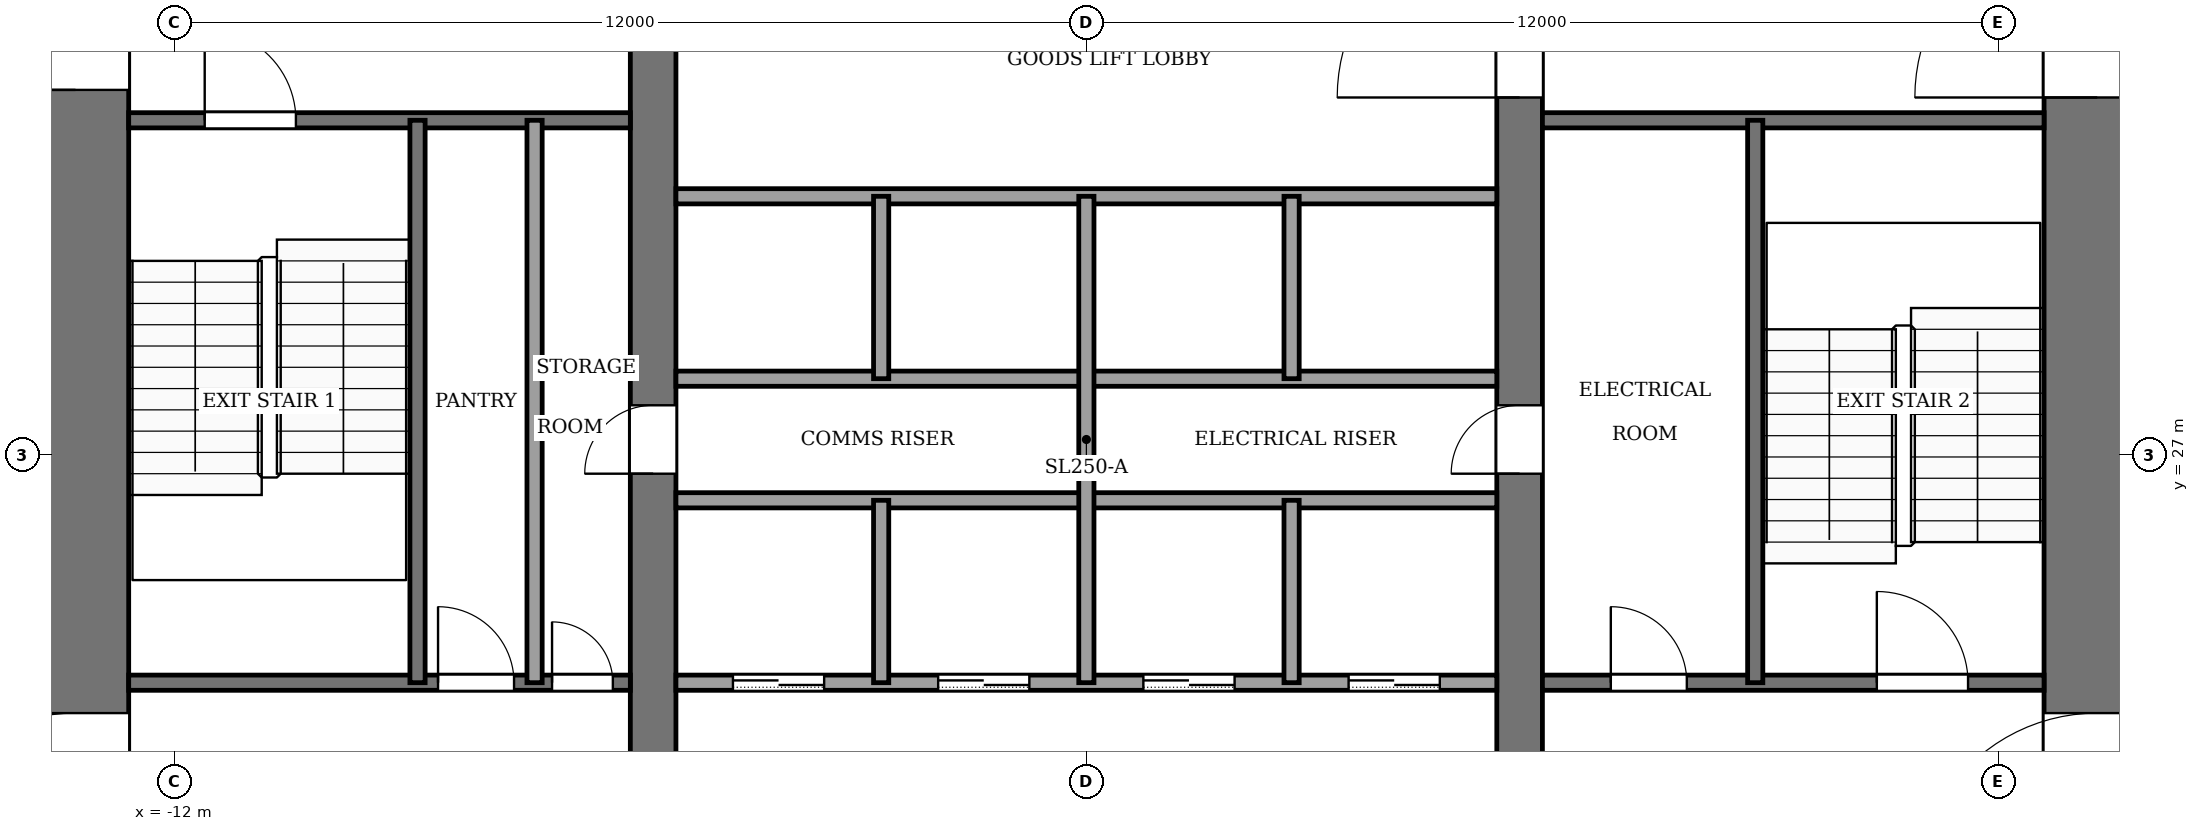
"""IFC4 building model, lengths in metres.
Left out: names, types, materials, properties, quantities, classifications, styles, units other than length and angle.
Written with IfcOpenShell. Run it as: python <this file> out.ifc"""

import sys

from ifc_helpers import new_model, si_unit, direction, frame, frame_2d, origin, place, context, subcontext, project, spatial, rectangle, extrude, element, fill, save


model = new_model("IFC4")
c1 = context("Model", 3, precision=1e-05, world=origin(), true_north=direction((0.0, 1.0)))
c2 = subcontext(c1, "Body", "Model", "MODEL_VIEW")
j1 = project(units=[si_unit("LENGTHUNIT", "METRE"), si_unit("PLANEANGLEUNIT", "RADIAN")], contexts=[c1])
p1 = place(None, origin())
s1 = spatial("IfcSite", under=j1, at=p1, CompositionType="ELEMENT")
p2 = place(p1, origin())
s2 = spatial("IfcBuilding", under=s1, at=p2, CompositionType="ELEMENT")
p3 = place(p2, frame((0.0, 0.0, 34.0)))
s3 = spatial("IfcBuildingStorey", under=s2, at=p3, CompositionType="ELEMENT", Elevation=34.0)
p4 = place(p3, frame((-13.3, 18.4, -0.13), z_axis=(0.0, 0.0, 1.0), x_axis=(0.0, 1.0, 0.0)))
e1 = element("IfcWall", 1, at=p4, inside=s3, PredefinedType="SHEAR", context=c2, shape_type="SweptSolid", body=[
    extrude(rectangle(XDim=19.2, YDim=1.4, at=frame_2d((9.6, 0.0))), origin(), (0.0, 0.0, 1.0), 4.0),
])
p5 = place(p4, frame((2.8, 0.0, 0.13)))
e2 = element("IfcOpeningElement", 2, at=p5, cuts=e1, PredefinedType="OPENING", context=c2, shape_type="SweptSolid", body=[
    extrude(rectangle(XDim=2.4, YDim=2.4, at=frame_2d((1.2, 1.2))), frame((0.0, 0.71, 0.0), z_axis=(0.0, -1.0, 0.0), x_axis=(1.0, 0.0, 0.0)), (0.0, 0.0, 1.0), 1.42),
])
p6 = place(p4, frame((13.4, 0.0, 0.13)))
e3 = element("IfcOpeningElement", 3, at=p6, cuts=e1, PredefinedType="OPENING", context=c2, shape_type="SweptSolid", body=[
    extrude(rectangle(XDim=1.4, YDim=2.2, at=frame_2d((0.7, 1.1))), frame((0.0, 0.71, 0.0), z_axis=(0.0, -1.0, 0.0), x_axis=(1.0, 0.0, 0.0)), (0.0, 0.0, 1.0), 1.42),
])
p7 = place(p3, frame((13.3, 18.4, -0.13), z_axis=(0.0, 0.0, 1.0), x_axis=(0.0, 1.0, 0.0)))
e4 = element("IfcWall", 4, at=p7, inside=s3, PredefinedType="SHEAR", context=c2, shape_type="SweptSolid", body=[
    extrude(rectangle(XDim=19.2, YDim=1.4, at=frame_2d((9.6, 0.0))), origin(), (0.0, 0.0, 1.0), 4.0),
])
p8 = place(p7, frame((2.8, 0.0, 0.13)))
e5 = element("IfcOpeningElement", 5, at=p8, cuts=e4, PredefinedType="OPENING", context=c2, shape_type="SweptSolid", body=[
    extrude(rectangle(XDim=2.4, YDim=2.4, at=frame_2d((1.2, 1.2))), frame((0.0, 0.71, 0.0), z_axis=(0.0, -1.0, 0.0), x_axis=(1.0, 0.0, 0.0)), (0.0, 0.0, 1.0), 1.42),
])
p9 = place(p7, frame((13.3, 0.0, 0.13)))
e6 = element("IfcOpeningElement", 6, at=p9, cuts=e4, PredefinedType="OPENING", context=c2, shape_type="SweptSolid", body=[
    extrude(rectangle(XDim=2.4, YDim=2.4, at=frame_2d((1.2, 1.2))), frame((0.0, 0.71, 0.0), z_axis=(0.0, -1.0, 0.0), x_axis=(1.0, 0.0, 0.0)), (0.0, 0.0, 1.0), 1.42),
])
p10 = place(p3, frame((-5.7, 18.4, -0.13), z_axis=(0.0, 0.0, 1.0), x_axis=(0.0, 1.0, 0.0)))
e7 = element("IfcWall", 7, at=p10, inside=s3, PredefinedType="SHEAR", context=c2, shape_type="SweptSolid", body=[
    extrude(rectangle(XDim=19.2, YDim=0.6, at=frame_2d((9.6, 0.0))), origin(), (0.0, 0.0, 1.0), 4.0),
])
p11 = place(p10, frame((8.35, 0.0, 0.13)))
e8 = element("IfcOpeningElement", 8, at=p11, cuts=e7, PredefinedType="OPENING", context=c2, shape_type="SweptSolid", body=[
    extrude(rectangle(XDim=0.9, YDim=2.1, at=frame_2d((0.45, 1.05))), frame((0.0, 0.31, 0.0), z_axis=(0.0, -1.0, 0.0), x_axis=(1.0, 0.0, 0.0)), (0.0, 0.0, 1.0), 0.62),
])
p12 = place(p3, frame((5.7, 18.4, -0.13), z_axis=(0.0, 0.0, 1.0), x_axis=(0.0, 1.0, 0.0)))
e9 = element("IfcWall", 9, at=p12, inside=s3, PredefinedType="SHEAR", context=c2, shape_type="SweptSolid", body=[
    extrude(rectangle(XDim=19.2, YDim=0.6, at=frame_2d((9.6, 0.0))), origin(), (0.0, 0.0, 1.0), 4.0),
])
p13 = place(p12, frame((8.35, 0.0, 0.13)))
e10 = element("IfcOpeningElement", 10, at=p13, cuts=e9, PredefinedType="OPENING", context=c2, shape_type="SweptSolid", body=[
    extrude(rectangle(XDim=0.9, YDim=2.1, at=frame_2d((0.45, 1.05))), frame((0.0, 0.31, 0.0), z_axis=(0.0, -1.0, 0.0), x_axis=(1.0, 0.0, 0.0)), (0.0, 0.0, 1.0), 0.62),
])
p14 = place(p12, frame((13.3, 0.0, 0.13)))
e11 = element("IfcOpeningElement", 11, at=p14, cuts=e9, PredefinedType="OPENING", context=c2, shape_type="SweptSolid", body=[
    extrude(rectangle(XDim=2.4, YDim=2.4, at=frame_2d((1.2, 1.2))), frame((0.0, 0.31, 0.0), z_axis=(0.0, -1.0, 0.0), x_axis=(1.0, 0.0, 0.0)), (0.0, 0.0, 1.0), 0.62),
])
p15 = place(p3, frame((-12.6, 24.0, 0.0), z_axis=(0.0, 0.0, 1.0), x_axis=(1.0, 0.0, 0.0)))
e12 = element("IfcWall", 12, at=p15, inside=s3, PredefinedType="PARTITIONING", context=c2, shape_type="SweptSolid", body=[
    extrude(rectangle(XDim=6.6, YDim=0.2, at=frame_2d((3.3, 0.0))), origin(), (0.0, 0.0, 1.0), 3.87),
])
p16 = place(p15, frame((4.07, 0.0, 0.0)))
e13 = element("IfcOpeningElement", 13, at=p16, cuts=e12, PredefinedType="OPENING", context=c2, shape_type="SweptSolid", body=[
    extrude(rectangle(XDim=1.0, YDim=2.1, at=frame_2d((0.5, 1.05))), frame((0.0, 0.11, 0.0), z_axis=(0.0, -1.0, 0.0), x_axis=(1.0, 0.0, 0.0)), (0.0, 0.0, 1.0), 0.22),
])
p17 = place(p15, frame((5.57, 0.0, 0.0)))
e14 = element("IfcOpeningElement", 14, at=p17, cuts=e12, PredefinedType="OPENING", context=c2, shape_type="SweptSolid", body=[
    extrude(rectangle(XDim=0.8, YDim=2.1, at=frame_2d((0.4, 1.05))), frame((0.0, 0.11, 0.0), z_axis=(0.0, -1.0, 0.0), x_axis=(1.0, 0.0, 0.0)), (0.0, 0.0, 1.0), 0.22),
])
p18 = place(p3, frame((-5.4, 24.0, 0.0), z_axis=(0.0, 0.0, 1.0), x_axis=(1.0, 0.0, 0.0)))
e15 = element("IfcWall", 15, at=p18, inside=s3, PredefinedType="PARTITIONING", context=c2, shape_type="SweptSolid", body=[
    extrude(rectangle(XDim=10.8, YDim=0.2, at=frame_2d((5.4, 0.0))), origin(), (0.0, 0.0, 1.0), 3.87),
])
p19 = place(p18, frame((0.75, 0.0, 0.0)))
e16 = element("IfcOpeningElement", 16, at=p19, cuts=e15, PredefinedType="OPENING", context=c2, shape_type="SweptSolid", body=[
    extrude(rectangle(XDim=1.2, YDim=2.2, at=frame_2d((0.6, 1.1))), frame((0.0, 0.11, 0.0), z_axis=(0.0, -1.0, 0.0), x_axis=(1.0, 0.0, 0.0)), (0.0, 0.0, 1.0), 0.22),
])
p20 = place(p18, frame((3.45, 0.0, 0.0)))
e17 = element("IfcOpeningElement", 17, at=p20, cuts=e15, PredefinedType="OPENING", context=c2, shape_type="SweptSolid", body=[
    extrude(rectangle(XDim=1.2, YDim=2.2, at=frame_2d((0.6, 1.1))), frame((0.0, 0.11, 0.0), z_axis=(0.0, -1.0, 0.0), x_axis=(1.0, 0.0, 0.0)), (0.0, 0.0, 1.0), 0.22),
])
p21 = place(p18, frame((6.15, 0.0, 0.0)))
e18 = element("IfcOpeningElement", 18, at=p21, cuts=e15, PredefinedType="OPENING", context=c2, shape_type="SweptSolid", body=[
    extrude(rectangle(XDim=1.2, YDim=2.2, at=frame_2d((0.6, 1.1))), frame((0.0, 0.11, 0.0), z_axis=(0.0, -1.0, 0.0), x_axis=(1.0, 0.0, 0.0)), (0.0, 0.0, 1.0), 0.22),
])
p22 = place(p18, frame((8.85, 0.0, 0.0)))
e19 = element("IfcOpeningElement", 19, at=p22, cuts=e15, PredefinedType="OPENING", context=c2, shape_type="SweptSolid", body=[
    extrude(rectangle(XDim=1.2, YDim=2.2, at=frame_2d((0.6, 1.1))), frame((0.0, 0.11, 0.0), z_axis=(0.0, -1.0, 0.0), x_axis=(1.0, 0.0, 0.0)), (0.0, 0.0, 1.0), 0.22),
])
p23 = place(p3, frame((6.0, 24.0, 0.0), z_axis=(0.0, 0.0, 1.0), x_axis=(1.0, 0.0, 0.0)))
e20 = element("IfcWall", 20, at=p23, inside=s3, PredefinedType="PARTITIONING", context=c2, shape_type="SweptSolid", body=[
    extrude(rectangle(XDim=6.6, YDim=0.2, at=frame_2d((3.3, 0.0))), origin(), (0.0, 0.0, 1.0), 3.87),
])
p24 = place(p23, frame((0.9, 0.0, 0.0)))
e21 = element("IfcOpeningElement", 21, at=p24, cuts=e20, PredefinedType="OPENING", context=c2, shape_type="SweptSolid", body=[
    extrude(rectangle(XDim=1.0, YDim=2.1, at=frame_2d((0.5, 1.05))), frame((0.0, 0.11, 0.0), z_axis=(0.0, -1.0, 0.0), x_axis=(1.0, 0.0, 0.0)), (0.0, 0.0, 1.0), 0.22),
])
p25 = place(p23, frame((4.4, 0.0, 0.0)))
e22 = element("IfcOpeningElement", 22, at=p25, cuts=e20, PredefinedType="OPENING", context=c2, shape_type="SweptSolid", body=[
    extrude(rectangle(XDim=1.2, YDim=2.2, at=frame_2d((0.6, 1.1))), frame((0.0, 0.11, 0.0), z_axis=(0.0, -1.0, 0.0), x_axis=(1.0, 0.0, 0.0)), (0.0, 0.0, 1.0), 0.22),
])
for number, where, z_axis, x_axis in (
    (23, (-5.4, 26.4, 0.0), (0.0, 0.0, 1.0), (1.0, 0.0, 0.0)),
    (24, (-5.4, 28.0, 0.0), (0.0, 0.0, 1.0), (1.0, 0.0, 0.0)),
    (25, (-5.4, 30.4, 0.0), (0.0, 0.0, 1.0), (1.0, 0.0, 0.0)),
):
    element("IfcWall", number, at=place(p3, frame(where, z_axis=z_axis, x_axis=x_axis)), inside=s3, PredefinedType="PARTITIONING", context=c2, shape_type="SweptSolid", body=[
        extrude(rectangle(XDim=10.8, YDim=0.2, at=frame_2d((5.4, 0.0))), origin(), (0.0, 0.0, 1.0), 3.87),
    ])
p26 = place(p3, frame((-12.6, 31.4, 0.0), z_axis=(0.0, 0.0, 1.0), x_axis=(1.0, 0.0, 0.0)))
e26 = element("IfcWall", 26, at=p26, inside=s3, PredefinedType="PARTITIONING", context=c2, shape_type="SweptSolid", body=[
    extrude(rectangle(XDim=6.6, YDim=0.2, at=frame_2d((3.3, 0.0))), origin(), (0.0, 0.0, 1.0), 3.87),
])
p27 = place(p26, frame((1.0, 0.0, 0.0)))
e27 = element("IfcOpeningElement", 27, at=p27, cuts=e26, PredefinedType="OPENING", context=c2, shape_type="SweptSolid", body=[
    extrude(rectangle(XDim=1.2, YDim=2.2, at=frame_2d((0.6, 1.1))), frame((0.0, 0.11, 0.0), z_axis=(0.0, -1.0, 0.0), x_axis=(1.0, 0.0, 0.0)), (0.0, 0.0, 1.0), 0.22),
])
p28 = place(p3, frame((6.0, 31.4, 0.0), z_axis=(0.0, 0.0, 1.0), x_axis=(1.0, 0.0, 0.0)))
e28 = element("IfcWall", 28, at=p28, inside=s3, PredefinedType="PARTITIONING", context=c2, shape_type="SweptSolid", body=[
    extrude(rectangle(XDim=6.6, YDim=0.2, at=frame_2d((3.3, 0.0))), origin(), (0.0, 0.0, 1.0), 3.87),
])
for number, where, z_axis, x_axis in (
    (29, (-8.8, 24.0, 0.0), (0.0, 0.0, 1.0), (0.0, 1.0, 0.0)),
    (30, (-7.26, 24.0, 0.0), (0.0, 0.0, 1.0), (0.0, 1.0, 0.0)),
):
    element("IfcWall", number, at=place(p3, frame(where, z_axis=z_axis, x_axis=x_axis)), inside=s3, PredefinedType="PARTITIONING", context=c2, shape_type="SweptSolid", body=[
        extrude(rectangle(XDim=7.4, YDim=0.2, at=frame_2d((3.7, 0.0))), origin(), (0.0, 0.0, 1.0), 3.87),
    ])
for number, where, z_axis, x_axis in (
    (31, (-2.7, 24.0, 0.0), (0.0, 0.0, 1.0), (0.0, 1.0, 0.0)),
    (32, (-2.7, 28.0, 0.0), (0.0, 0.0, 1.0), (0.0, 1.0, 0.0)),
):
    element("IfcWall", number, at=place(p3, frame(where, z_axis=z_axis, x_axis=x_axis)), inside=s3, PredefinedType="PARTITIONING", context=c2, shape_type="SweptSolid", body=[
        extrude(rectangle(XDim=2.4, YDim=0.2, at=frame_2d((1.2, 0.0))), origin(), (0.0, 0.0, 1.0), 3.87),
    ])
p29 = place(p3, frame((0.0, 24.0, 0.0), z_axis=(0.0, 0.0, 1.0), x_axis=(0.0, 1.0, 0.0)))
e33 = element("IfcWall", 33, at=p29, inside=s3, PredefinedType="PARTITIONING", context=c2, shape_type="SweptSolid", body=[
    extrude(rectangle(XDim=6.4, YDim=0.2, at=frame_2d((3.2, 0.0))), origin(), (0.0, 0.0, 1.0), 3.87),
])
for number, where, z_axis, x_axis in (
    (34, (2.7, 24.0, 0.0), (0.0, 0.0, 1.0), (0.0, 1.0, 0.0)),
    (35, (2.7, 28.0, 0.0), (0.0, 0.0, 1.0), (0.0, 1.0, 0.0)),
):
    element("IfcWall", number, at=place(p3, frame(where, z_axis=z_axis, x_axis=x_axis)), inside=s3, PredefinedType="PARTITIONING", context=c2, shape_type="SweptSolid", body=[
        extrude(rectangle(XDim=2.4, YDim=0.2, at=frame_2d((1.2, 0.0))), origin(), (0.0, 0.0, 1.0), 3.87),
    ])
p30 = place(p3, frame((8.8, 24.0, 0.0), z_axis=(0.0, 0.0, 1.0), x_axis=(0.0, 1.0, 0.0)))
e36 = element("IfcWall", 36, at=p30, inside=s3, PredefinedType="PARTITIONING", context=c2, shape_type="SweptSolid", body=[
    extrude(rectangle(XDim=7.4, YDim=0.2, at=frame_2d((3.7, 0.0))), origin(), (0.0, 0.0, 1.0), 3.87),
])
p31 = place(p19, origin())
e37 = element("IfcDoor", 37, at=p31, inside=s3, OperationType="SLIDING_TO_LEFT", PredefinedType="DOOR", context=c2, shape_type="SweptSolid", body=[
    extrude(rectangle(XDim=1.2, YDim=2.2, at=frame_2d((0.6, 1.1))), frame((0.0, 0.025, 0.0), z_axis=(0.0, -1.0, 0.0), x_axis=(1.0, 0.0, 0.0)), (0.0, 0.0, 1.0), 0.05),
])
fill(e16, e37)
p32 = place(p20, origin())
e38 = element("IfcDoor", 38, at=p32, inside=s3, OperationType="SLIDING_TO_LEFT", PredefinedType="DOOR", context=c2, shape_type="SweptSolid", body=[
    extrude(rectangle(XDim=1.2, YDim=2.2, at=frame_2d((0.6, 1.1))), frame((0.0, 0.025, 0.0), z_axis=(0.0, -1.0, 0.0), x_axis=(1.0, 0.0, 0.0)), (0.0, 0.0, 1.0), 0.05),
])
fill(e17, e38)
p33 = place(p21, origin())
e39 = element("IfcDoor", 39, at=p33, inside=s3, OperationType="SLIDING_TO_LEFT", PredefinedType="DOOR", context=c2, shape_type="SweptSolid", body=[
    extrude(rectangle(XDim=1.2, YDim=2.2, at=frame_2d((0.6, 1.1))), frame((0.0, 0.025, 0.0), z_axis=(0.0, -1.0, 0.0), x_axis=(1.0, 0.0, 0.0)), (0.0, 0.0, 1.0), 0.05),
])
fill(e18, e39)
p34 = place(p22, origin())
e40 = element("IfcDoor", 40, at=p34, inside=s3, OperationType="SLIDING_TO_LEFT", PredefinedType="DOOR", context=c2, shape_type="SweptSolid", body=[
    extrude(rectangle(XDim=1.2, YDim=2.2, at=frame_2d((0.6, 1.1))), frame((0.0, 0.025, 0.0), z_axis=(0.0, -1.0, 0.0), x_axis=(1.0, 0.0, 0.0)), (0.0, 0.0, 1.0), 0.05),
])
fill(e19, e40)
p35 = place(p16, origin())
e41 = element("IfcDoor", 41, at=p35, inside=s3, OperationType="SINGLE_SWING_RIGHT", PredefinedType="DOOR", context=c2, shape_type="SweptSolid", body=[
    extrude(rectangle(XDim=1.0, YDim=2.1, at=frame_2d((0.5, 1.05))), frame((0.0, 0.025, 0.0), z_axis=(0.0, -1.0, 0.0), x_axis=(1.0, 0.0, 0.0)), (0.0, 0.0, 1.0), 0.05),
])
fill(e13, e41)
p36 = place(p17, origin())
e42 = element("IfcDoor", 42, at=p36, inside=s3, OperationType="SINGLE_SWING_LEFT", PredefinedType="DOOR", context=c2, shape_type="SweptSolid", body=[
    extrude(rectangle(XDim=0.8, YDim=2.1, at=frame_2d((0.4, 1.05))), frame((0.0, 0.025, 0.0), z_axis=(0.0, -1.0, 0.0), x_axis=(1.0, 0.0, 0.0)), (0.0, 0.0, 1.0), 0.05),
])
fill(e14, e42)
p37 = place(p24, origin())
e43 = element("IfcDoor", 43, at=p37, inside=s3, OperationType="SINGLE_SWING_RIGHT", PredefinedType="DOOR", context=c2, shape_type="SweptSolid", body=[
    extrude(rectangle(XDim=1.0, YDim=2.1, at=frame_2d((0.5, 1.05))), frame((0.0, 0.025, 0.0), z_axis=(0.0, -1.0, 0.0), x_axis=(1.0, 0.0, 0.0)), (0.0, 0.0, 1.0), 0.05),
])
fill(e21, e43)
p38 = place(p11, origin())
e44 = element("IfcDoor", 44, at=p38, inside=s3, OperationType="SINGLE_SWING_LEFT", PredefinedType="DOOR", context=c2, shape_type="SweptSolid", body=[
    extrude(rectangle(XDim=0.9, YDim=2.1, at=frame_2d((0.45, 1.05))), frame((0.0, 0.025, 0.0), z_axis=(0.0, -1.0, 0.0), x_axis=(1.0, 0.0, 0.0)), (0.0, 0.0, 1.0), 0.05),
])
fill(e8, e44)
p39 = place(p13, origin())
e45 = element("IfcDoor", 45, at=p39, inside=s3, OperationType="SINGLE_SWING_RIGHT", PredefinedType="DOOR", context=c2, shape_type="SweptSolid", body=[
    extrude(rectangle(XDim=0.9, YDim=2.1, at=frame_2d((0.45, 1.05))), frame((0.0, 0.025, 0.0), z_axis=(0.0, -1.0, 0.0), x_axis=(1.0, 0.0, 0.0)), (0.0, 0.0, 1.0), 0.05),
])
fill(e10, e45)
p40 = place(p27, origin())
e46 = element("IfcDoor", 46, at=p40, inside=s3, OperationType="SINGLE_SWING_RIGHT", PredefinedType="DOOR", context=c2, shape_type="SweptSolid", body=[
    extrude(rectangle(XDim=1.2, YDim=2.2, at=frame_2d((0.6, 1.1))), frame((0.0, 0.025, 0.0), z_axis=(0.0, -1.0, 0.0), x_axis=(1.0, 0.0, 0.0)), (0.0, 0.0, 1.0), 0.05),
])
fill(e27, e46)
p41 = place(p25, origin())
e47 = element("IfcDoor", 47, at=p41, inside=s3, OperationType="SINGLE_SWING_LEFT", PredefinedType="DOOR", context=c2, shape_type="SweptSolid", body=[
    extrude(rectangle(XDim=1.2, YDim=2.2, at=frame_2d((0.6, 1.1))), frame((0.0, 0.025, 0.0), z_axis=(0.0, -1.0, 0.0), x_axis=(1.0, 0.0, 0.0)), (0.0, 0.0, 1.0), 0.05),
])
fill(e22, e47)
p42 = place(p14, origin())
e48 = element("IfcDoor", 48, at=p42, inside=s3, OperationType="DOUBLE_DOOR_SINGLE_SWING", PredefinedType="DOOR", context=c2, shape_type="SweptSolid", body=[
    extrude(rectangle(XDim=2.4, YDim=2.4, at=frame_2d((1.2, 1.2))), frame((0.0, 0.025, 0.0), z_axis=(0.0, -1.0, 0.0), x_axis=(1.0, 0.0, 0.0)), (0.0, 0.0, 1.0), 0.05),
])
fill(e11, e48)
p43 = place(p5, origin())
e49 = element("IfcDoor", 49, at=p43, inside=s3, OperationType="DOUBLE_DOOR_SINGLE_SWING", PredefinedType="DOOR", context=c2, shape_type="SweptSolid", body=[
    extrude(rectangle(XDim=2.4, YDim=2.4, at=frame_2d((1.2, 1.2))), frame((0.0, 0.025, 0.0), z_axis=(0.0, -1.0, 0.0), x_axis=(1.0, 0.0, 0.0)), (0.0, 0.0, 1.0), 0.05),
])
fill(e2, e49)
p44 = place(p8, origin())
e50 = element("IfcDoor", 50, at=p44, inside=s3, OperationType="DOUBLE_DOOR_SINGLE_SWING", PredefinedType="DOOR", context=c2, shape_type="SweptSolid", body=[
    extrude(rectangle(XDim=2.4, YDim=2.4, at=frame_2d((1.2, 1.2))), frame((0.0, 0.025, 0.0), z_axis=(0.0, -1.0, 0.0), x_axis=(1.0, 0.0, 0.0)), (0.0, 0.0, 1.0), 0.05),
])
fill(e5, e50)
p45 = place(p9, origin())
e51 = element("IfcDoor", 51, at=p45, inside=s3, OperationType="DOUBLE_DOOR_SINGLE_SWING", PredefinedType="DOOR", context=c2, shape_type="SweptSolid", body=[
    extrude(rectangle(XDim=2.4, YDim=2.4, at=frame_2d((1.2, 1.2))), frame((0.0, 0.025, 0.0), z_axis=(0.0, -1.0, 0.0), x_axis=(1.0, 0.0, 0.0)), (0.0, 0.0, 1.0), 0.05),
])
fill(e6, e51)
p46 = place(p6, origin())
e52 = element("IfcDoor", 52, at=p46, inside=s3, OperationType="SINGLE_SWING_RIGHT", PredefinedType="DOOR", context=c2, shape_type="SweptSolid", body=[
    extrude(rectangle(XDim=1.4, YDim=2.2, at=frame_2d((0.7, 1.1))), frame((0.0, 0.025, 0.0), z_axis=(0.0, -1.0, 0.0), x_axis=(1.0, 0.0, 0.0)), (0.0, 0.0, 1.0), 0.05),
])
fill(e3, e52)
save(model, sys.argv[1])
